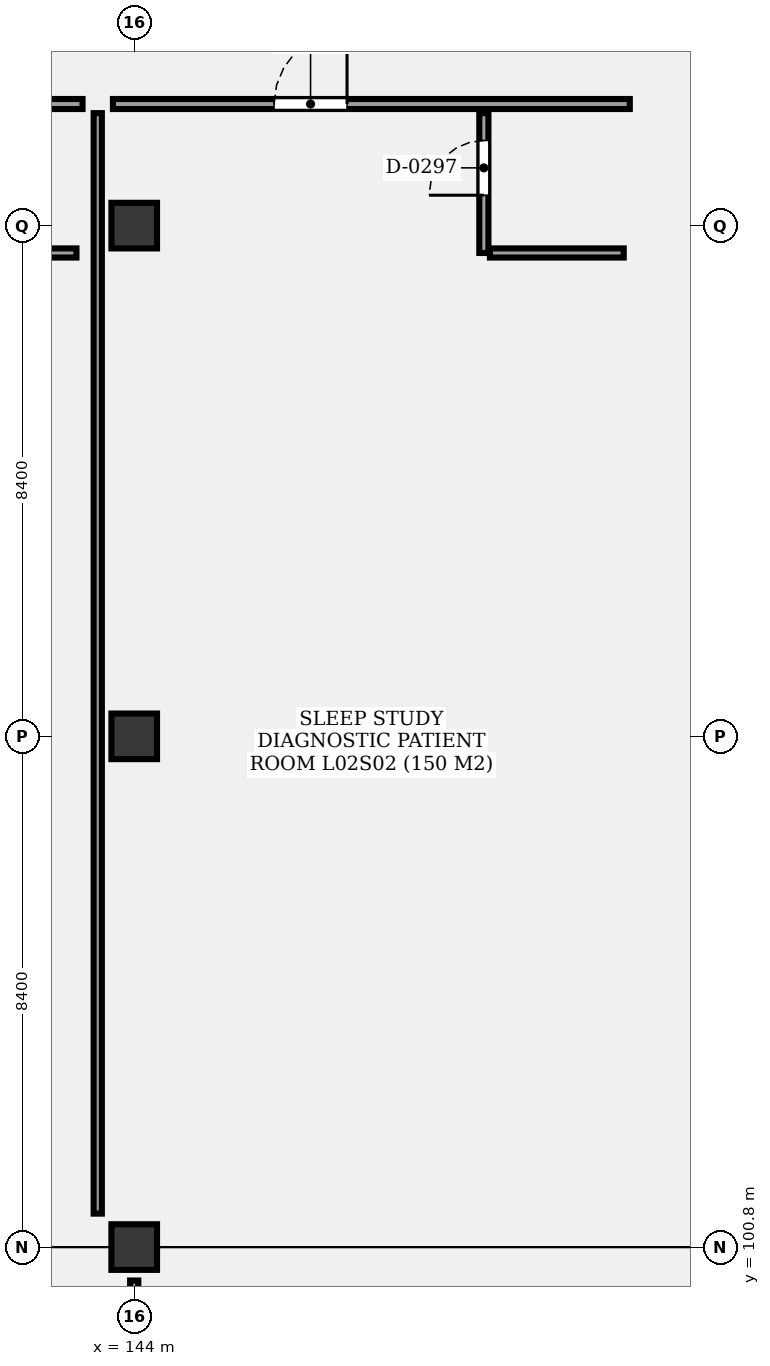
"""IFC4 building model, lengths in metres.
Left out: names, types, materials, properties, quantities, classifications, styles, units other than length and angle.
Written with IfcOpenShell. Run it as: python <this file> out.ifc"""

import sys

from ifc_helpers import new_model, si_unit, direction, frame, frame_2d, origin, origin_2d, place, context, subcontext, project, spatial, rectangle, extrude, element, fill, save


model = new_model("IFC4")
c1 = context("Model", 3, precision=1e-05, world=origin(), true_north=direction((0.0, 1.0)))
c2 = subcontext(c1, "Body", "Model", "MODEL_VIEW")
j1 = project(units=[si_unit("LENGTHUNIT", "METRE"), si_unit("PLANEANGLEUNIT", "RADIAN")], contexts=[c1])
p1 = place(None, origin())
s1 = spatial("IfcSite", under=j1, at=p1, CompositionType="ELEMENT")
p2 = place(p1, origin())
s2 = spatial("IfcBuilding", under=s1, at=p2, CompositionType="ELEMENT")
p3 = place(p2, frame((0.0, 0.0, 9.9)))
s3 = spatial("IfcBuildingStorey", under=s2, at=p3, CompositionType="ELEMENT", Elevation=9.9)
for number, where, z_axis, x_axis in (
    (1, (144.0, 100.8, 0.0), (0.0, 0.0, 1.0), (1.0, 0.0, 0.0)),
    (2, (144.0, 109.2, 0.0), (0.0, 0.0, 1.0), (1.0, 0.0, 0.0)),
    (3, (144.0, 117.6, 0.0), (0.0, 0.0, 1.0), (1.0, 0.0, 0.0)),
):
    element("IfcColumn", number, at=place(p3, frame(where, z_axis=z_axis, x_axis=x_axis)), inside=s3, PredefinedType="COLUMN", context=c2, shape_type="SweptSolid", body=[
        extrude(rectangle(XDim=0.75, YDim=0.75, at=origin_2d()), origin(), (0.0, 0.0, 1.0), 3.6),
    ])
p4 = place(p3, frame((144.0, 90.55, 0.0), z_axis=(0.0, 0.0, 1.0), x_axis=(0.0, 1.0, 0.0)))
e4 = element("IfcWall", 4, at=p4, inside=s3, PredefinedType="PARTITIONING", context=c2, shape_type="SweptSolid", body=[
    extrude(rectangle(XDim=9.7, YDim=0.135, at=frame_2d((4.85, 0.0))), origin(), (0.0, 0.0, 1.0), 2.48),
])
p5 = place(p3, frame((134.65, 119.6, 0.0), z_axis=(0.0, 0.0, 1.0), x_axis=(1.0, 0.0, 0.0)))
e5 = element("IfcWall", 5, at=p5, inside=s3, PredefinedType="PARTITIONING", context=c2, shape_type="SweptSolid", body=[
    extrude(rectangle(XDim=8.5, YDim=0.165, at=frame_2d((4.25, 0.0))), origin(), (0.0, 0.0, 1.0), 2.48),
])
p6 = place(p5, frame((2.65, 0.0, 0.0)))
e6 = element("IfcOpeningElement", 6, at=p6, cuts=e5, PredefinedType="OPENING", context=c2, shape_type="SweptSolid", body=[
    extrude(rectangle(XDim=1.25, YDim=2.2, at=frame_2d((0.625, 1.1))), frame((0.0, 0.093, 0.0), z_axis=(0.0, -1.0, 0.0), x_axis=(1.0, 0.0, 0.0)), (0.0, 0.0, 1.0), 0.185),
])
p7 = place(p3, frame((140.85, 117.15, 0.0), z_axis=(0.0, 0.0, 1.0), x_axis=(1.0, 0.0, 0.0)))
e7 = element("IfcWall", 7, at=p7, inside=s3, PredefinedType="PARTITIONING", context=c2, shape_type="SweptSolid", body=[
    extrude(rectangle(XDim=2.2, YDim=0.15, at=frame_2d((1.1, 0.0))), origin(), (0.0, 0.0, 1.0), 2.48),
])
p8 = place(p3, frame((143.65, 119.6, 0.0), z_axis=(0.0, 0.0, 1.0), x_axis=(1.0, 0.0, 0.0)))
e8 = element("IfcWall", 8, at=p8, inside=s3, PredefinedType="PARTITIONING", context=c2, shape_type="SweptSolid", body=[
    extrude(rectangle(XDim=8.5, YDim=0.165, at=frame_2d((4.25, 0.0))), origin(), (0.0, 0.0, 1.0), 2.48),
])
p9 = place(p8, frame((2.65, 0.0, 0.0)))
e9 = element("IfcOpeningElement", 9, at=p9, cuts=e8, PredefinedType="OPENING", context=c2, shape_type="SweptSolid", body=[
    extrude(rectangle(XDim=1.2, YDim=2.2, at=frame_2d((0.6, 1.1))), frame((0.0, 0.093, 0.0), z_axis=(0.0, -1.0, 0.0), x_axis=(1.0, 0.0, 0.0)), (0.0, 0.0, 1.0), 0.185),
])
p10 = place(p3, frame((149.75, 117.15, 0.0), z_axis=(0.0, 0.0, 1.0), x_axis=(0.0, 1.0, 0.0)))
e10 = element("IfcWall", 10, at=p10, inside=s3, PredefinedType="PARTITIONING", context=c2, shape_type="SweptSolid", body=[
    extrude(rectangle(XDim=2.3, YDim=0.15, at=frame_2d((1.15, 0.0))), origin(), (0.0, 0.0, 1.0), 2.48),
])
p11 = place(p10, frame((0.95, 0.0, 0.0)))
e11 = element("IfcOpeningElement", 11, at=p11, cuts=e10, PredefinedType="OPENING", context=c2, shape_type="SweptSolid", body=[
    extrude(rectangle(XDim=0.9, YDim=2.1, at=frame_2d((0.45, 1.05))), frame((0.0, 0.085, 0.0), z_axis=(0.0, -1.0, 0.0), x_axis=(1.0, 0.0, 0.0)), (0.0, 0.0, 1.0), 0.17),
])
p12 = place(p3, frame((149.85, 117.15, 0.0), z_axis=(0.0, 0.0, 1.0), x_axis=(1.0, 0.0, 0.0)))
e12 = element("IfcWall", 12, at=p12, inside=s3, PredefinedType="PARTITIONING", context=c2, shape_type="SweptSolid", body=[
    extrude(rectangle(XDim=2.2, YDim=0.15, at=frame_2d((1.1, 0.0))), origin(), (0.0, 0.0, 1.0), 2.48),
])
p13 = place(p3, frame((143.4, 101.35, 0.0), z_axis=(0.0, 0.0, 1.0), x_axis=(0.0, 1.0, 0.0)))
e13 = element("IfcWall", 13, at=p13, inside=s3, PredefinedType="PARTITIONING", context=c2, shape_type="SweptSolid", body=[
    extrude(rectangle(XDim=18.1, YDim=0.135, at=frame_2d((9.05, 0.0))), origin(), (0.0, 0.0, 1.0), 2.48),
])
p14 = place(p9, origin())
e14 = element("IfcDoor", 14, at=p14, inside=s3, OperationType="SINGLE_SWING_RIGHT", PredefinedType="DOOR", context=c2, shape_type="SweptSolid", body=[
    extrude(rectangle(XDim=1.2, YDim=2.2, at=frame_2d((0.6, 1.1))), frame((0.0, 0.025, 0.0), z_axis=(0.0, -1.0, 0.0), x_axis=(1.0, 0.0, 0.0)), (0.0, 0.0, 1.0), 0.05),
])
fill(e9, e14)
p15 = place(p11, origin())
e15 = element("IfcDoor", 15, at=p15, inside=s3, OperationType="SINGLE_SWING_LEFT", PredefinedType="DOOR", context=c2, shape_type="SweptSolid", body=[
    extrude(rectangle(XDim=0.9, YDim=2.1, at=frame_2d((0.45, 1.05))), frame((0.0, 0.025, 0.0), z_axis=(0.0, -1.0, 0.0), x_axis=(1.0, 0.0, 0.0)), (0.0, 0.0, 1.0), 0.05),
])
fill(e11, e15)
save(model, sys.argv[1])
